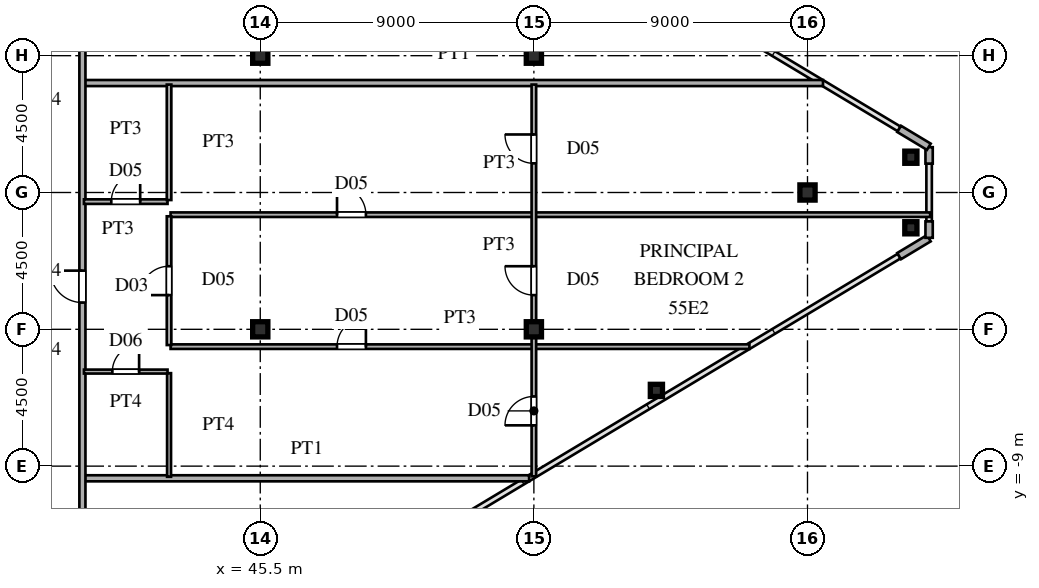
"""IFC4 building model, lengths in metres.
Left out: names, types, materials, properties, quantities, classifications, styles, units other than length and angle.
Written with IfcOpenShell. Run it as: python <this file> out.ifc"""

import sys

from ifc_helpers import new_model, si_unit, direction, frame, frame_2d, origin, origin_2d, place, context, subcontext, project, spatial, rectangle, hollow_rectangle, i_section, extrude, source, transform, mapped, element, fill, save


model = new_model("IFC4")
c1 = context("Model", 3, precision=1e-05, world=origin(), true_north=direction((0.0, 1.0)))
c2 = subcontext(c1, "Body", "Model", "MODEL_VIEW")
j1 = project(units=[si_unit("LENGTHUNIT", "METRE"), si_unit("PLANEANGLEUNIT", "RADIAN")], contexts=[c1])
p1 = place(None, origin())
s1 = spatial("IfcSite", under=j1, at=p1, CompositionType="ELEMENT")
p2 = place(p1, origin())
s2 = spatial("IfcBuilding", under=s1, at=p2, CompositionType="ELEMENT")
p3 = place(p2, frame((0.0, 0.0, 206.7)))
s3 = spatial("IfcBuildingStorey", under=s2, at=p3, CompositionType="ELEMENT", Elevation=206.7)
m1 = source(origin(), c2, "Body", "SweptSolid", [
    extrude(i_section(OverallWidth=0.5, OverallDepth=0.5, WebThickness=0.02, FlangeThickness=0.032, at=origin_2d()), origin(), (0.0, 0.0, 1.0), 3.6),
])
for number, where, z_axis, x_axis in (
    (1, (45.5, -4.5, 0.0), (0.0, 0.0, 1.0), (1.0, 0.0, 0.0)),
    (2, (45.5, 4.5, 0.0), (0.0, 0.0, 1.0), (1.0, 0.0, 0.0)),
    (3, (54.5, -4.5, 0.0), (0.0, 0.0, 1.0), (1.0, 0.0, 0.0)),
    (4, (54.5, 4.5, 0.0), (0.0, 0.0, 1.0), (1.0, 0.0, 0.0)),
    (5, (63.5, 0.0, 0.0), (0.0, 0.0, 1.0), (1.0, 0.0, 0.0)),
):
    element("IfcColumn", number, at=place(p3, frame(where, z_axis=z_axis, x_axis=x_axis)), inside=s3, PredefinedType="COLUMN", context=c2, shape_type="MappedRepresentation", body=[
        mapped(m1, transform((0.0, 0.0, 0.0), scale=1.0)),
    ])
m2 = source(origin(), c2, "Body", "SweptSolid", [
    extrude(hollow_rectangle(XDim=0.4, YDim=0.4, WallThickness=0.016, at=origin_2d()), origin(), (0.0, 0.0, 1.0), 3.6),
])
for number, where, z_axis, x_axis in (
    (6, (66.9, -1.16, 0.0), (0.0, 0.0, 1.0), (1.0, 0.0, 0.0)),
    (7, (66.9, 1.16, 0.0), (0.0, 0.0, 1.0), (1.0, 0.0, 0.0)),
    (8, (58.53, -6.509, 0.0), (0.0, 0.0, 1.0), (1.0, 0.0, 0.0)),
):
    element("IfcColumn", number, at=place(p3, frame(where, z_axis=z_axis, x_axis=x_axis)), inside=s3, PredefinedType="COLUMN", context=c2, shape_type="MappedRepresentation", body=[
        mapped(m2, transform((0.0, 0.0, 0.0), scale=1.0)),
    ])
p4 = place(p3, frame((66.514, -2.092, 0.0), z_axis=(0.0, 0.0, 1.0), x_axis=(0.85743623509, 0.514590228002, 0.0)))
e9 = element("IfcWall", 9, at=p4, inside=s3, PredefinedType="SOLIDWALL", context=c2, shape_type="SweptSolid", body=[
    extrude(rectangle(XDim=1.14, YDim=0.24, at=frame_2d((0.57, 0.0))), origin(), (0.0, 0.0, 1.0), 3.38),
])
for number, where, z_axis, x_axis in (
    (10, (67.5, -1.49, 0.0), (0.0, 0.0, 1.0), (0.0, 1.0, 0.0)),
    (11, (67.5, 0.95, 0.0), (0.0, 0.0, 1.0), (0.0, 1.0, 0.0)),
):
    element("IfcWall", number, at=place(p3, frame(where, z_axis=z_axis, x_axis=x_axis)), inside=s3, PredefinedType="SOLIDWALL", context=c2, shape_type="SweptSolid", body=[
        extrude(rectangle(XDim=0.54, YDim=0.24, at=frame_2d((0.27, 0.0))), origin(), (0.0, 0.0, 1.0), 3.38),
    ])
p5 = place(p3, frame((67.491, 1.505, 0.0), z_axis=(0.0, 0.0, 1.0), x_axis=(-0.85743623509, 0.514590228002, 0.0)))
e12 = element("IfcWall", 12, at=p5, inside=s3, PredefinedType="SOLIDWALL", context=c2, shape_type="SweptSolid", body=[
    extrude(rectangle(XDim=1.14, YDim=0.24, at=frame_2d((0.57, 0.0))), origin(), (0.0, 0.0, 1.0), 3.38),
])
p6 = place(p3, frame((39.73, -9.4, 0.0), z_axis=(0.0, 0.0, 1.0), x_axis=(1.0, 0.0, 0.0)))
e13 = element("IfcWall", 13, at=p6, inside=s3, PredefinedType="PARTITIONING", context=c2, shape_type="SweptSolid", body=[
    extrude(rectangle(XDim=14.613, YDim=0.2, at=frame_2d((7.307, 0.0))), origin(), (0.0, 0.0, 1.0), 3.38),
])
p7 = place(p3, frame((39.7, -5.89, 0.0), z_axis=(0.0, 0.0, 1.0), x_axis=(1.0, 0.0, 0.0)))
e14 = element("IfcWall", 14, at=p7, inside=s3, PredefinedType="PARTITIONING", context=c2, shape_type="SweptSolid", body=[
    extrude(rectangle(XDim=2.75, YDim=0.13, at=frame_2d((1.375, 0.0))), origin(), (0.0, 0.0, 1.0), 3.38),
])
p8 = place(p7, frame((0.935, 0.0, 0.0)))
e15 = element("IfcOpeningElement", 15, at=p8, cuts=e14, PredefinedType="OPENING", context=c2, shape_type="SweptSolid", body=[
    extrude(rectangle(XDim=0.88, YDim=2.1, at=frame_2d((0.44, 1.05))), frame((0.0, 0.075, 0.0), z_axis=(0.0, -1.0, 0.0), x_axis=(1.0, 0.0, 0.0)), (0.0, 0.0, 1.0), 0.15),
])
p9 = place(p3, frame((42.55, -5.07, 0.0), z_axis=(0.0, 0.0, 1.0), x_axis=(1.0, 0.0, 0.0)))
e16 = element("IfcWall", 16, at=p9, inside=s3, PredefinedType="PARTITIONING", context=c2, shape_type="SweptSolid", body=[
    extrude(rectangle(XDim=19.04, YDim=0.15, at=frame_2d((9.52, 0.0))), origin(), (0.0, 0.0, 1.0), 3.38),
])
p10 = place(p9, frame((5.475, 0.0, 0.0)))
e17 = element("IfcOpeningElement", 17, at=p10, cuts=e16, PredefinedType="OPENING", context=c2, shape_type="SweptSolid", body=[
    extrude(rectangle(XDim=0.95, YDim=2.15, at=frame_2d((0.475, 1.075))), frame((0.0, 0.085, 0.0), z_axis=(0.0, -1.0, 0.0), x_axis=(1.0, 0.0, 0.0)), (0.0, 0.0, 1.0), 0.17),
])
p11 = place(p3, frame((42.55, -0.73, 0.0), z_axis=(0.0, 0.0, 1.0), x_axis=(1.0, 0.0, 0.0)))
e18 = element("IfcWall", 18, at=p11, inside=s3, PredefinedType="PARTITIONING", context=c2, shape_type="SweptSolid", body=[
    extrude(rectangle(XDim=24.985, YDim=0.15, at=frame_2d((12.492, 0.0))), origin(), (0.0, 0.0, 1.0), 3.38),
])
p12 = place(p11, frame((5.475, 0.0, 0.0)))
e19 = element("IfcOpeningElement", 19, at=p12, cuts=e18, PredefinedType="OPENING", context=c2, shape_type="SweptSolid", body=[
    extrude(rectangle(XDim=0.95, YDim=2.15, at=frame_2d((0.475, 1.075))), frame((0.0, 0.085, 0.0), z_axis=(0.0, -1.0, 0.0), x_axis=(1.0, 0.0, 0.0)), (0.0, 0.0, 1.0), 0.17),
])
p13 = place(p3, frame((39.7, -0.3, 0.0), z_axis=(0.0, 0.0, 1.0), x_axis=(1.0, 0.0, 0.0)))
e20 = element("IfcWall", 20, at=p13, inside=s3, PredefinedType="PARTITIONING", context=c2, shape_type="SweptSolid", body=[
    extrude(rectangle(XDim=2.75, YDim=0.15, at=frame_2d((1.375, 0.0))), origin(), (0.0, 0.0, 1.0), 3.38),
])
p14 = place(p13, frame((0.9, 0.0, 0.0)))
e21 = element("IfcOpeningElement", 21, at=p14, cuts=e20, PredefinedType="OPENING", context=c2, shape_type="SweptSolid", body=[
    extrude(rectangle(XDim=0.95, YDim=2.15, at=frame_2d((0.475, 1.075))), frame((0.0, 0.085, 0.0), z_axis=(0.0, -1.0, 0.0), x_axis=(1.0, 0.0, 0.0)), (0.0, 0.0, 1.0), 0.17),
])
p15 = place(p3, frame((39.73, 3.6, 0.0), z_axis=(0.0, 0.0, 1.0), x_axis=(1.0, 0.0, 0.0)))
e22 = element("IfcWall", 22, at=p15, inside=s3, PredefinedType="PARTITIONING", context=c2, shape_type="SweptSolid", body=[
    extrude(rectangle(XDim=24.28, YDim=0.2, at=frame_2d((12.14, 0.0))), origin(), (0.0, 0.0, 1.0), 3.38),
])
p16 = place(p3, frame((39.65, -15.715, 0.0), z_axis=(0.0, 0.0, 1.0), x_axis=(0.0, 1.0, 0.0)))
e23 = element("IfcWall", 23, at=p16, inside=s3, PredefinedType="PARTITIONING", context=c2, shape_type="SweptSolid", body=[
    extrude(rectangle(XDim=31.43, YDim=0.2, at=frame_2d((15.715, 0.0))), origin(), (0.0, 0.0, 1.0), 3.38),
])
p17 = place(p16, frame((2.59, 0.0, 0.0)))
e24 = element("IfcOpeningElement", 24, at=p17, cuts=e23, PredefinedType="OPENING", context=c2, shape_type="SweptSolid", body=[
    extrude(rectangle(XDim=1.05, YDim=2.25, at=frame_2d((0.525, 1.125))), frame((0.0, 0.11, 0.0), z_axis=(0.0, -1.0, 0.0), x_axis=(1.0, 0.0, 0.0)), (0.0, 0.0, 1.0), 0.22),
])
p18 = place(p16, frame((12.095, 0.0, 0.0)))
e25 = element("IfcOpeningElement", 25, at=p18, cuts=e23, PredefinedType="OPENING", context=c2, shape_type="SweptSolid", body=[
    extrude(rectangle(XDim=1.05, YDim=2.25, at=frame_2d((0.525, 1.125))), frame((0.0, 0.11, 0.0), z_axis=(0.0, -1.0, 0.0), x_axis=(1.0, 0.0, 0.0)), (0.0, 0.0, 1.0), 0.22),
])
p19 = place(p16, frame((24.89, 0.0, 0.0)))
e26 = element("IfcOpeningElement", 26, at=p19, cuts=e23, PredefinedType="OPENING", context=c2, shape_type="SweptSolid", body=[
    extrude(rectangle(XDim=1.05, YDim=2.25, at=frame_2d((0.525, 1.125))), frame((0.0, 0.11, 0.0), z_axis=(0.0, -1.0, 0.0), x_axis=(1.0, 0.0, 0.0)), (0.0, 0.0, 1.0), 0.22),
])
p20 = place(p3, frame((42.5, -9.35, 0.0), z_axis=(0.0, 0.0, 1.0), x_axis=(0.0, 1.0, 0.0)))
e27 = element("IfcWall", 27, at=p20, inside=s3, PredefinedType="PARTITIONING", context=c2, shape_type="SweptSolid", body=[
    extrude(rectangle(XDim=3.408, YDim=0.13, at=frame_2d((1.704, 0.0))), origin(), (0.0, 0.0, 1.0), 3.38),
])
p21 = place(p3, frame((42.5, -5.017, 0.0), z_axis=(0.0, 0.0, 1.0), x_axis=(0.0, 1.0, 0.0)))
e28 = element("IfcWall", 28, at=p21, inside=s3, PredefinedType="PARTITIONING", context=c2, shape_type="SweptSolid", body=[
    extrude(rectangle(XDim=4.234, YDim=0.15, at=frame_2d((2.117, 0.0))), origin(), (0.0, 0.0, 1.0), 3.38),
])
p22 = place(p21, frame((1.642, 0.0, 0.0)))
e29 = element("IfcOpeningElement", 29, at=p22, cuts=e28, PredefinedType="OPENING", context=c2, shape_type="SweptSolid", body=[
    extrude(rectangle(XDim=0.95, YDim=2.15, at=frame_2d((0.475, 1.075))), frame((0.0, 0.085, 0.0), z_axis=(0.0, -1.0, 0.0), x_axis=(1.0, 0.0, 0.0)), (0.0, 0.0, 1.0), 0.17),
])
p23 = place(p3, frame((42.5, -0.248, 0.0), z_axis=(0.0, 0.0, 1.0), x_axis=(0.0, 1.0, 0.0)))
e30 = element("IfcWall", 30, at=p23, inside=s3, PredefinedType="PARTITIONING", context=c2, shape_type="SweptSolid", body=[
    extrude(rectangle(XDim=3.798, YDim=0.15, at=frame_2d((1.899, 0.0))), origin(), (0.0, 0.0, 1.0), 3.38),
])
p24 = place(p3, frame((54.5, -9.335, 0.0), z_axis=(0.0, 0.0, 1.0), x_axis=(0.0, 1.0, 0.0)))
e31 = element("IfcWall", 31, at=p24, inside=s3, PredefinedType="PARTITIONING", context=c2, shape_type="SweptSolid", body=[
    extrude(rectangle(XDim=12.885, YDim=0.15, at=frame_2d((6.442, 0.0))), origin(), (0.0, 0.0, 1.0), 2.78),
])
p25 = place(p24, frame((5.96, 0.0, 0.0)))
e32 = element("IfcOpeningElement", 32, at=p25, cuts=e31, PredefinedType="OPENING", context=c2, shape_type="SweptSolid", body=[
    extrude(rectangle(XDim=0.95, YDim=2.15, at=frame_2d((0.475, 1.075))), frame((0.0, 0.085, 0.0), z_axis=(0.0, -1.0, 0.0), x_axis=(1.0, 0.0, 0.0)), (0.0, 0.0, 1.0), 0.17),
])
p26 = place(p24, frame((1.677, 0.0, 0.0)))
e33 = element("IfcOpeningElement", 33, at=p26, cuts=e31, PredefinedType="OPENING", context=c2, shape_type="SweptSolid", body=[
    extrude(rectangle(XDim=0.95, YDim=2.15, at=frame_2d((0.475, 1.075))), frame((0.0, 0.085, 0.0), z_axis=(0.0, -1.0, 0.0), x_axis=(1.0, 0.0, 0.0)), (0.0, 0.0, 1.0), 0.17),
])
p27 = place(p24, frame((10.293, 0.0, 0.0)))
e34 = element("IfcOpeningElement", 34, at=p27, cuts=e31, PredefinedType="OPENING", context=c2, shape_type="SweptSolid", body=[
    extrude(rectangle(XDim=0.95, YDim=2.15, at=frame_2d((0.475, 1.075))), frame((0.0, 0.085, 0.0), z_axis=(0.0, -1.0, 0.0), x_axis=(1.0, 0.0, 0.0)), (0.0, 0.0, 1.0), 0.17),
])
m3 = source(origin(), c2, "Body", "SweptSolid", [
    extrude(rectangle(XDim=0.88, YDim=2.1, at=frame_2d((0.44, 1.05))), frame((0.0, 0.025, 0.0), z_axis=(0.0, -1.0, 0.0), x_axis=(1.0, 0.0, 0.0)), (0.0, 0.0, 1.0), 0.05),
])
p28 = place(p8, origin())
e35 = element("IfcDoor", 35, at=p28, inside=s3, OperationType="SINGLE_SWING_RIGHT", PredefinedType="DOOR", context=c2, shape_type="MappedRepresentation", body=[
    mapped(m3, transform((0.0, 0.0, 0.0), scale=1.0)),
])
fill(e15, e35)
m4 = source(origin(), c2, "Body", "SweptSolid", [
    extrude(rectangle(XDim=0.95, YDim=2.15, at=frame_2d((0.475, 1.075))), frame((0.0, 0.025, 0.0), z_axis=(0.0, -1.0, 0.0), x_axis=(1.0, 0.0, 0.0)), (0.0, 0.0, 1.0), 0.05),
])
p29 = place(p10, origin())
e36 = element("IfcDoor", 36, at=p29, inside=s3, OperationType="SINGLE_SWING_RIGHT", PredefinedType="DOOR", context=c2, shape_type="MappedRepresentation", body=[
    mapped(m4, transform((0.0, 0.0, 0.0), scale=1.0)),
])
fill(e17, e36)
p30 = place(p12, origin())
e37 = element("IfcDoor", 37, at=p30, inside=s3, OperationType="SINGLE_SWING_LEFT", PredefinedType="DOOR", context=c2, shape_type="MappedRepresentation", body=[
    mapped(m4, transform((0.0, 0.0, 0.0), scale=1.0)),
])
fill(e19, e37)
p31 = place(p14, origin())
e38 = element("IfcDoor", 38, at=p31, inside=s3, OperationType="SINGLE_SWING_RIGHT", PredefinedType="DOOR", context=c2, shape_type="MappedRepresentation", body=[
    mapped(m4, transform((0.0, 0.0, 0.0), scale=1.0)),
])
fill(e21, e38)
m5 = source(origin(), c2, "Body", "SweptSolid", [
    extrude(rectangle(XDim=1.05, YDim=2.25, at=frame_2d((0.525, 1.125))), frame((0.0, 0.025, 0.0), z_axis=(0.0, -1.0, 0.0), x_axis=(1.0, 0.0, 0.0)), (0.0, 0.0, 1.0), 0.05),
])
p32 = place(p18, origin())
e39 = element("IfcDoor", 39, at=p32, inside=s3, OperationType="SINGLE_SWING_RIGHT", PredefinedType="DOOR", context=c2, shape_type="MappedRepresentation", body=[
    mapped(m5, transform((0.0, 0.0, 0.0), scale=1.0)),
])
fill(e25, e39)
p33 = place(p22, origin())
e40 = element("IfcDoor", 40, at=p33, inside=s3, OperationType="SINGLE_SWING_LEFT", PredefinedType="DOOR", context=c2, shape_type="MappedRepresentation", body=[
    mapped(m4, transform((0.0, 0.0, 0.0), scale=1.0)),
])
fill(e29, e40)
p34 = place(p25, origin())
e41 = element("IfcDoor", 41, at=p34, inside=s3, OperationType="SINGLE_SWING_RIGHT", PredefinedType="DOOR", context=c2, shape_type="MappedRepresentation", body=[
    mapped(m4, transform((0.0, 0.0, 0.0), scale=1.0)),
])
fill(e32, e41)
p35 = place(p26, origin())
e42 = element("IfcDoor", 42, at=p35, inside=s3, OperationType="SINGLE_SWING_LEFT", PredefinedType="DOOR", context=c2, shape_type="MappedRepresentation", body=[
    mapped(m4, transform((0.0, 0.0, 0.0), scale=1.0)),
])
fill(e33, e42)
p36 = place(p27, origin())
e43 = element("IfcDoor", 43, at=p36, inside=s3, OperationType="SINGLE_SWING_RIGHT", PredefinedType="DOOR", context=c2, shape_type="MappedRepresentation", body=[
    mapped(m4, transform((0.0, 0.0, 0.0), scale=1.0)),
])
fill(e34, e43)
save(model, sys.argv[1])
